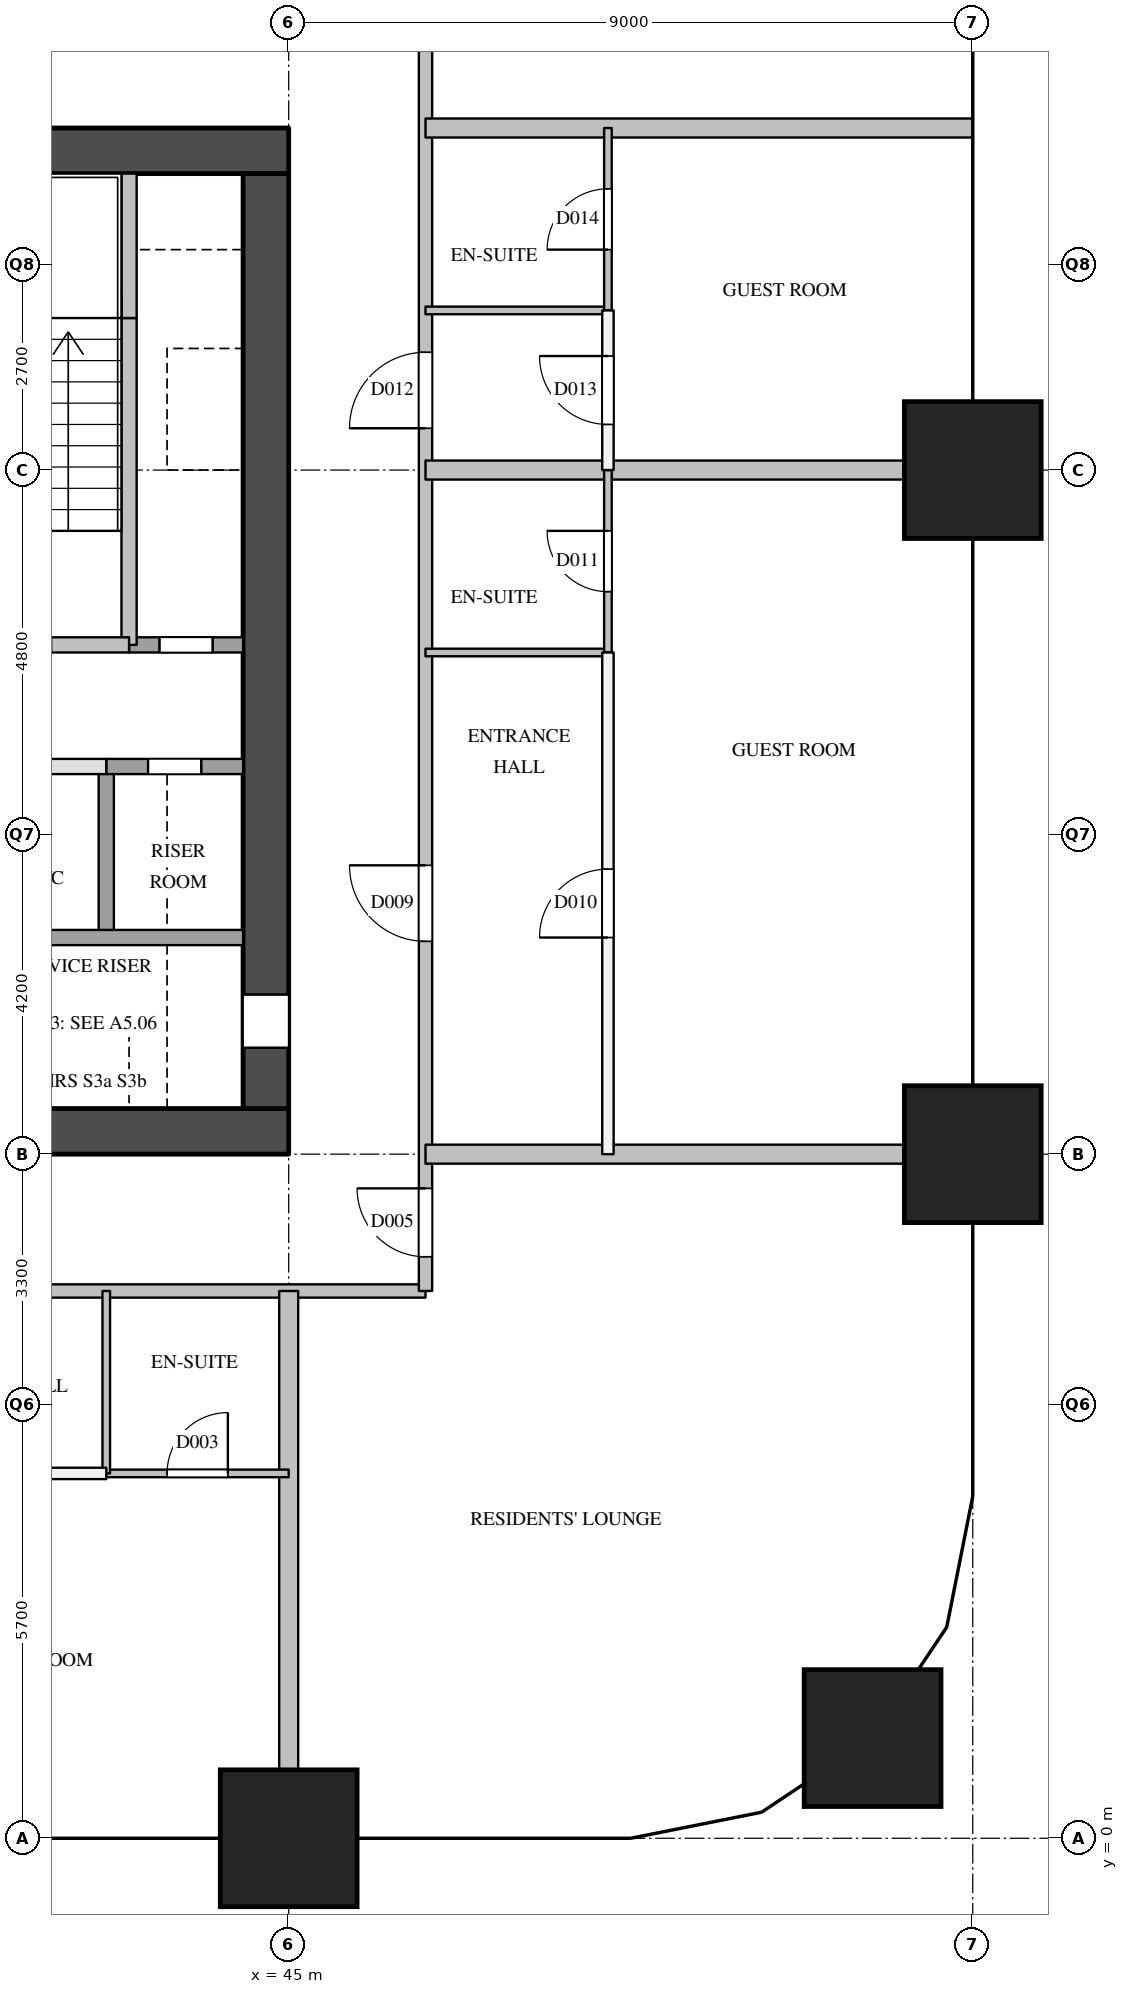
"""IFC4 building model, lengths in metres.
Left out: names, types, materials, properties, quantities, classifications, styles, units other than length and angle.
Written with IfcOpenShell. Run it as: python <this file> out.ifc"""

import sys

from ifc_helpers import new_model, si_unit, direction, frame, frame_2d, origin, origin_2d, place, context, subcontext, project, spatial, rectangle, extrude, element, fill, save


model = new_model("IFC4")
c1 = context("Model", 3, precision=1e-05, world=origin(), true_north=direction((0.0, 1.0)))
c2 = subcontext(c1, "Body", "Model", "MODEL_VIEW")
j1 = project(units=[si_unit("LENGTHUNIT", "METRE"), si_unit("PLANEANGLEUNIT", "RADIAN")], contexts=[c1])
p1 = place(None, origin())
s1 = spatial("IfcSite", under=j1, at=p1, CompositionType="ELEMENT")
p2 = place(p1, origin())
s2 = spatial("IfcBuilding", under=s1, at=p2, CompositionType="ELEMENT")
p3 = place(p2, frame((0.0, 0.0, 100.6)))
s3 = spatial("IfcBuildingStorey", under=s2, at=p3, CompositionType="ELEMENT", Elevation=100.6)
for number, where, z_axis, x_axis in (
    (1, (45.0, 0.0, 0.0), (0.0, 0.0, 1.0), (1.0, 0.0, 0.0)),
    (2, (52.682, 1.318, 0.0), (0.0, 0.0, 1.0), (1.0, 0.0, 0.0)),
    (3, (54.0, 9.0, 0.0), (0.0, 0.0, 1.0), (1.0, 0.0, 0.0)),
    (4, (54.0, 18.0, 0.0), (0.0, 0.0, 1.0), (1.0, 0.0, 0.0)),
):
    element("IfcColumn", number, at=place(p3, frame(where, z_axis=z_axis, x_axis=x_axis)), inside=s3, PredefinedType="COLUMN", context=c2, shape_type="SweptSolid", body=[
        extrude(rectangle(XDim=1.8, YDim=1.8, at=origin_2d()), origin(), (0.0, 0.0, 1.0), 3.8),
    ])
for number, where, z_axis, x_axis in (
    (5, (36.0, 9.3, 0.0), (0.0, 0.0, 1.0), (1.0, 0.0, 0.0)),
    (6, (36.0, 22.2, 0.0), (0.0, 0.0, 1.0), (1.0, 0.0, 0.0)),
):
    element("IfcWall", number, at=place(p3, frame(where, z_axis=z_axis, x_axis=x_axis)), inside=s3, PredefinedType="SHEAR", context=c2, shape_type="SweptSolid", body=[
        extrude(rectangle(XDim=9.0, YDim=0.6, at=frame_2d((4.5, 0.0))), origin(), (0.0, 0.0, 1.0), 3.5),
    ])
p4 = place(p3, frame((44.7, 9.6, 0.0), z_axis=(0.0, 0.0, 1.0), x_axis=(0.0, 1.0, 0.0)))
e7 = element("IfcWall", 7, at=p4, inside=s3, PredefinedType="SHEAR", context=c2, shape_type="SweptSolid", body=[
    extrude(rectangle(XDim=12.3, YDim=0.6, at=frame_2d((6.15, 0.0))), origin(), (0.0, 0.0, 1.0), 3.5),
])
p5 = place(p4, frame((0.8, 0.0, 0.0)))
e8 = element("IfcOpeningElement", 8, at=p5, cuts=e7, PredefinedType="OPENING", context=c2, shape_type="SweptSolid", body=[
    extrude(rectangle(XDim=0.7, YDim=2.1, at=frame_2d((0.35, 1.05))), frame((0.0, 0.31, 0.0), z_axis=(0.0, -1.0, 0.0), x_axis=(1.0, 0.0, 0.0)), (0.0, 0.0, 1.0), 0.62),
])
p6 = place(p3, frame((42.6, 11.9, 0.0), z_axis=(0.0, 0.0, 1.0), x_axis=(0.0, 1.0, 0.0)))
e9 = element("IfcWall", 9, at=p6, inside=s3, PredefinedType="SOLIDWALL", context=c2, shape_type="SweptSolid", body=[
    extrude(rectangle(XDim=2.2, YDim=0.2, at=frame_2d((1.1, 0.0))), origin(), (0.0, 0.0, 1.0), 3.5),
])
p7 = place(p3, frame((42.9, 15.7, 0.0), z_axis=(0.0, 0.0, 1.0), x_axis=(0.0, 1.0, 0.0)))
e10 = element("IfcWall", 10, at=p7, inside=s3, PredefinedType="SOLIDWALL", context=c2, shape_type="SweptSolid", body=[
    extrude(rectangle(XDim=4.3, YDim=0.2, at=frame_2d((2.15, 0.0))), origin(), (0.0, 0.0, 1.0), 3.5),
])
p8 = place(p3, frame((42.9, 20.0, 0.0), z_axis=(0.0, 0.0, 1.0), x_axis=(0.0, 1.0, 0.0)))
e11 = element("IfcWall", 11, at=p8, inside=s3, PredefinedType="SOLIDWALL", context=c2, shape_type="SweptSolid", body=[
    extrude(rectangle(XDim=1.9, YDim=0.2, at=frame_2d((0.95, 0.0))), origin(), (0.0, 0.0, 1.0), 3.5),
])
p9 = place(p3, frame((36.6, 11.85, 0.0), z_axis=(0.0, 0.0, 1.0), x_axis=(1.0, 0.0, 0.0)))
e12 = element("IfcWall", 12, at=p9, inside=s3, PredefinedType="SOLIDWALL", context=c2, shape_type="SweptSolid", body=[
    extrude(rectangle(XDim=7.8, YDim=0.2, at=frame_2d((3.9, 0.0))), origin(), (0.0, 0.0, 1.0), 3.5),
])
p10 = place(p3, frame((36.6, 14.1, 0.0), z_axis=(0.0, 0.0, 1.0), x_axis=(1.0, 0.0, 0.0)))
e13 = element("IfcWall", 13, at=p10, inside=s3, PredefinedType="PARTITIONING", context=c2, shape_type="SweptSolid", body=[
    extrude(rectangle(XDim=6.0, YDim=0.2, at=frame_2d((3.0, 0.0))), origin(), (0.0, 0.0, 1.0), 3.5),
])
p11 = place(p10, frame((0.9, 0.0, 0.0)))
e14 = element("IfcOpeningElement", 14, at=p11, cuts=e13, PredefinedType="OPENING", context=c2, shape_type="SweptSolid", body=[
    extrude(rectangle(XDim=0.9, YDim=2.1, at=frame_2d((0.45, 1.05))), frame((0.0, 0.11, 0.0), z_axis=(0.0, -1.0, 0.0), x_axis=(1.0, 0.0, 0.0)), (0.0, 0.0, 1.0), 0.22),
])
p12 = place(p10, frame((3.9, 0.0, 0.0)))
e15 = element("IfcOpeningElement", 15, at=p12, cuts=e13, PredefinedType="OPENING", context=c2, shape_type="SweptSolid", body=[
    extrude(rectangle(XDim=0.9, YDim=2.1, at=frame_2d((0.45, 1.05))), frame((0.0, 0.11, 0.0), z_axis=(0.0, -1.0, 0.0), x_axis=(1.0, 0.0, 0.0)), (0.0, 0.0, 1.0), 0.22),
])
p13 = place(p3, frame((42.6, 14.1, 0.0), z_axis=(0.0, 0.0, 1.0), x_axis=(1.0, 0.0, 0.0)))
e16 = element("IfcWall", 16, at=p13, inside=s3, PredefinedType="SOLIDWALL", context=c2, shape_type="SweptSolid", body=[
    extrude(rectangle(XDim=1.8, YDim=0.2, at=frame_2d((0.9, 0.0))), origin(), (0.0, 0.0, 1.0), 3.5),
])
p14 = place(p13, frame((0.55, 0.0, 0.0)))
e17 = element("IfcOpeningElement", 17, at=p14, cuts=e16, PredefinedType="OPENING", context=c2, shape_type="SweptSolid", body=[
    extrude(rectangle(XDim=0.7, YDim=2.1, at=frame_2d((0.35, 1.05))), frame((0.0, 0.11, 0.0), z_axis=(0.0, -1.0, 0.0), x_axis=(1.0, 0.0, 0.0)), (0.0, 0.0, 1.0), 0.22),
])
p15 = place(p3, frame((42.9, 15.7, 0.0), z_axis=(0.0, 0.0, 1.0), x_axis=(1.0, 0.0, 0.0)))
e18 = element("IfcWall", 18, at=p15, inside=s3, PredefinedType="SOLIDWALL", context=c2, shape_type="SweptSolid", body=[
    extrude(rectangle(XDim=1.5, YDim=0.2, at=frame_2d((0.75, 0.0))), origin(), (0.0, 0.0, 1.0), 3.5),
])
p16 = place(p15, frame((0.4, 0.0, 0.0)))
e19 = element("IfcOpeningElement", 19, at=p16, cuts=e18, PredefinedType="OPENING", context=c2, shape_type="SweptSolid", body=[
    extrude(rectangle(XDim=0.7, YDim=2.1, at=frame_2d((0.35, 1.05))), frame((0.0, 0.11, 0.0), z_axis=(0.0, -1.0, 0.0), x_axis=(1.0, 0.0, 0.0)), (0.0, 0.0, 1.0), 0.22),
])
p17 = place(p3, frame((36.6, 15.7, 0.0), z_axis=(0.0, 0.0, 1.0), x_axis=(1.0, 0.0, 0.0)))
e20 = element("IfcWall", 20, at=p17, inside=s3, PredefinedType="SOLIDWALL", context=c2, shape_type="SweptSolid", body=[
    extrude(rectangle(XDim=6.3, YDim=0.2, at=frame_2d((3.15, 0.0))), origin(), (0.0, 0.0, 1.0), 3.5),
])
p18 = place(p17, frame((1.025, 0.0, 0.0)))
e21 = element("IfcOpeningElement", 21, at=p18, cuts=e20, PredefinedType="OPENING", context=c2, shape_type="SweptSolid", body=[
    extrude(rectangle(XDim=1.1, YDim=2.1, at=frame_2d((0.55, 1.05))), frame((0.0, 0.11, 0.0), z_axis=(0.0, -1.0, 0.0), x_axis=(1.0, 0.0, 0.0)), (0.0, 0.0, 1.0), 0.22),
])
p19 = place(p17, frame((4.175, 0.0, 0.0)))
e22 = element("IfcOpeningElement", 22, at=p19, cuts=e20, PredefinedType="OPENING", context=c2, shape_type="SweptSolid", body=[
    extrude(rectangle(XDim=1.1, YDim=2.1, at=frame_2d((0.55, 1.05))), frame((0.0, 0.11, 0.0), z_axis=(0.0, -1.0, 0.0), x_axis=(1.0, 0.0, 0.0)), (0.0, 0.0, 1.0), 0.22),
])
p20 = place(p3, frame((34.2, 7.2, 0.0), z_axis=(0.0, 0.0, 1.0), x_axis=(1.0, 0.0, 0.0)))
e23 = element("IfcWall", 23, at=p20, inside=s3, PredefinedType="PARTITIONING", context=c2, shape_type="SweptSolid", body=[
    extrude(rectangle(XDim=12.6, YDim=0.175, at=frame_2d((6.3, 0.0))), origin(), (0.0, 0.0, 1.0), 3.5),
])
p21 = place(p20, frame((4.6, 0.0, 0.0)))
e24 = element("IfcOpeningElement", 24, at=p21, cuts=e23, PredefinedType="OPENING", context=c2, shape_type="SweptSolid", body=[
    extrude(rectangle(XDim=1.0, YDim=2.1, at=frame_2d((0.5, 1.05))), frame((0.0, 0.097, 0.0), z_axis=(0.0, -1.0, 0.0), x_axis=(1.0, 0.0, 0.0)), (0.0, 0.0, 1.0), 0.195),
])
p22 = place(p3, frame((46.8, 7.2, 0.0), z_axis=(0.0, 0.0, 1.0), x_axis=(0.0, 1.0, 0.0)))
e25 = element("IfcWall", 25, at=p22, inside=s3, PredefinedType="PARTITIONING", context=c2, shape_type="SweptSolid", body=[
    extrude(rectangle(XDim=16.49, YDim=0.175, at=frame_2d((8.245, 0.0))), origin(), (0.0, 0.0, 1.0), 3.5),
])
p23 = place(p22, frame((0.45, 0.0, 0.0)))
e26 = element("IfcOpeningElement", 26, at=p23, cuts=e25, PredefinedType="OPENING", context=c2, shape_type="SweptSolid", body=[
    extrude(rectangle(XDim=0.9, YDim=2.1, at=frame_2d((0.45, 1.05))), frame((0.0, 0.097, 0.0), z_axis=(0.0, -1.0, 0.0), x_axis=(1.0, 0.0, 0.0)), (0.0, 0.0, 1.0), 0.195),
])
p24 = place(p22, frame((4.6, 0.0, 0.0)))
e27 = element("IfcOpeningElement", 27, at=p24, cuts=e25, PredefinedType="OPENING", context=c2, shape_type="SweptSolid", body=[
    extrude(rectangle(XDim=1.0, YDim=2.1, at=frame_2d((0.5, 1.05))), frame((0.0, 0.097, 0.0), z_axis=(0.0, -1.0, 0.0), x_axis=(1.0, 0.0, 0.0)), (0.0, 0.0, 1.0), 0.195),
])
p25 = place(p22, frame((11.35, 0.0, 0.0)))
e28 = element("IfcOpeningElement", 28, at=p25, cuts=e25, PredefinedType="OPENING", context=c2, shape_type="SweptSolid", body=[
    extrude(rectangle(XDim=1.0, YDim=2.1, at=frame_2d((0.5, 1.05))), frame((0.0, 0.097, 0.0), z_axis=(0.0, -1.0, 0.0), x_axis=(1.0, 0.0, 0.0)), (0.0, 0.0, 1.0), 0.195),
])
p26 = place(p3, frame((36.0, 4.8, 0.0), z_axis=(0.0, 0.0, 1.0), x_axis=(1.0, 0.0, 0.0)))
e29 = element("IfcWall", 29, at=p26, inside=s3, PredefinedType="PARTITIONING", context=c2, shape_type="SweptSolid", body=[
    extrude(rectangle(XDim=6.6, YDim=0.15, at=frame_2d((3.3, 0.0))), origin(), (0.0, 0.0, 1.0), 3.5),
])
p27 = place(p26, frame((2.85, 0.0, 0.0)))
e30 = element("IfcOpeningElement", 30, at=p27, cuts=e29, PredefinedType="OPENING", context=c2, shape_type="SweptSolid", body=[
    extrude(rectangle(XDim=0.9, YDim=2.1, at=frame_2d((0.45, 1.05))), frame((0.0, 0.085, 0.0), z_axis=(0.0, -1.0, 0.0), x_axis=(1.0, 0.0, 0.0)), (0.0, 0.0, 1.0), 0.17),
])
p28 = place(p3, frame((49.2, 9.0, 0.0), z_axis=(0.0, 0.0, 1.0), x_axis=(0.0, 1.0, 0.0)))
e31 = element("IfcWall", 31, at=p28, inside=s3, PredefinedType="PARTITIONING", context=c2, shape_type="SweptSolid", body=[
    extrude(rectangle(XDim=6.6, YDim=0.15, at=frame_2d((3.3, 0.0))), origin(), (0.0, 0.0, 1.0), 3.5),
])
p29 = place(p28, frame((2.85, 0.0, 0.0)))
e32 = element("IfcOpeningElement", 32, at=p29, cuts=e31, PredefinedType="OPENING", context=c2, shape_type="SweptSolid", body=[
    extrude(rectangle(XDim=0.9, YDim=2.1, at=frame_2d((0.45, 1.05))), frame((0.0, 0.085, 0.0), z_axis=(0.0, -1.0, 0.0), x_axis=(1.0, 0.0, 0.0)), (0.0, 0.0, 1.0), 0.17),
])
p30 = place(p3, frame((49.2, 18.0, 0.0), z_axis=(0.0, 0.0, 1.0), x_axis=(0.0, 1.0, 0.0)))
e33 = element("IfcWall", 33, at=p30, inside=s3, PredefinedType="PARTITIONING", context=c2, shape_type="SweptSolid", body=[
    extrude(rectangle(XDim=2.1, YDim=0.15, at=frame_2d((1.05, 0.0))), origin(), (0.0, 0.0, 1.0), 3.5),
])
p31 = place(p30, frame((0.6, 0.0, 0.0)))
e34 = element("IfcOpeningElement", 34, at=p31, cuts=e33, PredefinedType="OPENING", context=c2, shape_type="SweptSolid", body=[
    extrude(rectangle(XDim=0.9, YDim=2.1, at=frame_2d((0.45, 1.05))), frame((0.0, 0.085, 0.0), z_axis=(0.0, -1.0, 0.0), x_axis=(1.0, 0.0, 0.0)), (0.0, 0.0, 1.0), 0.17),
])
for number, where, z_axis, x_axis in (
    (35, (46.8, 9.0, 0.0), (0.0, 0.0, 1.0), (1.0, 0.0, 0.0)),
    (36, (46.8, 18.0, 0.0), (0.0, 0.0, 1.0), (1.0, 0.0, 0.0)),
):
    element("IfcWall", number, at=place(p3, frame(where, z_axis=z_axis, x_axis=x_axis)), inside=s3, PredefinedType="PARTITIONING", context=c2, shape_type="SweptSolid", body=[
        extrude(rectangle(XDim=7.2, YDim=0.25, at=frame_2d((3.6, 0.0))), origin(), (0.0, 0.0, 1.0), 3.5),
    ])
p32 = place(p3, frame((46.8, 22.5, 0.0), z_axis=(0.0, 0.0, 1.0), x_axis=(1.0, 0.0, 0.0)))
e37 = element("IfcWall", 37, at=p32, inside=s3, PredefinedType="PARTITIONING", context=c2, shape_type="SweptSolid", body=[
    extrude(rectangle(XDim=7.2, YDim=0.25, at=frame_2d((3.6, 0.0))), origin(), (0.0, 0.0, 1.0), 2.5),
])
p33 = place(p3, frame((45.0, 0.0, 0.0), z_axis=(0.0, 0.0, 1.0), x_axis=(0.0, 1.0, 0.0)))
e38 = element("IfcWall", 38, at=p33, inside=s3, PredefinedType="PARTITIONING", context=c2, shape_type="SweptSolid", body=[
    extrude(rectangle(XDim=7.2, YDim=0.25, at=frame_2d((3.6, 0.0))), origin(), (0.0, 0.0, 1.0), 3.5),
])
p34 = place(p3, frame((42.6, 4.8, 0.0), z_axis=(0.0, 0.0, 1.0), x_axis=(1.0, 0.0, 0.0)))
e39 = element("IfcWall", 39, at=p34, inside=s3, PredefinedType="PARTITIONING", context=c2, shape_type="SweptSolid", body=[
    extrude(rectangle(XDim=2.4, YDim=0.1, at=frame_2d((1.2, 0.0))), origin(), (0.0, 0.0, 1.0), 3.5),
])
p35 = place(p34, frame((0.8, 0.0, 0.0)))
e40 = element("IfcOpeningElement", 40, at=p35, cuts=e39, PredefinedType="OPENING", context=c2, shape_type="SweptSolid", body=[
    extrude(rectangle(XDim=0.8, YDim=2.1, at=frame_2d((0.4, 1.05))), frame((0.0, 0.06, 0.0), z_axis=(0.0, -1.0, 0.0), x_axis=(1.0, 0.0, 0.0)), (0.0, 0.0, 1.0), 0.12),
])
for number, where, z_axis, x_axis in (
    (41, (46.8, 15.6, 0.0), (0.0, 0.0, 1.0), (1.0, 0.0, 0.0)),
    (42, (46.8, 20.1, 0.0), (0.0, 0.0, 1.0), (1.0, 0.0, 0.0)),
    (43, (42.6, 4.8, 0.0), (0.0, 0.0, 1.0), (0.0, 1.0, 0.0)),
):
    element("IfcWall", number, at=place(p3, frame(where, z_axis=z_axis, x_axis=x_axis)), inside=s3, PredefinedType="PARTITIONING", context=c2, shape_type="SweptSolid", body=[
        extrude(rectangle(XDim=2.4, YDim=0.1, at=frame_2d((1.2, 0.0))), origin(), (0.0, 0.0, 1.0), 3.5),
    ])
p36 = place(p3, frame((49.2, 15.6, 0.0), z_axis=(0.0, 0.0, 1.0), x_axis=(0.0, 1.0, 0.0)))
e44 = element("IfcWall", 44, at=p36, inside=s3, PredefinedType="PARTITIONING", context=c2, shape_type="SweptSolid", body=[
    extrude(rectangle(XDim=2.4, YDim=0.1, at=frame_2d((1.2, 0.0))), origin(), (0.0, 0.0, 1.0), 3.5),
])
p37 = place(p36, frame((0.8, 0.0, 0.0)))
e45 = element("IfcOpeningElement", 45, at=p37, cuts=e44, PredefinedType="OPENING", context=c2, shape_type="SweptSolid", body=[
    extrude(rectangle(XDim=0.8, YDim=2.1, at=frame_2d((0.4, 1.05))), frame((0.0, 0.06, 0.0), z_axis=(0.0, -1.0, 0.0), x_axis=(1.0, 0.0, 0.0)), (0.0, 0.0, 1.0), 0.12),
])
p38 = place(p3, frame((49.2, 20.1, 0.0), z_axis=(0.0, 0.0, 1.0), x_axis=(0.0, 1.0, 0.0)))
e46 = element("IfcWall", 46, at=p38, inside=s3, PredefinedType="PARTITIONING", context=c2, shape_type="SweptSolid", body=[
    extrude(rectangle(XDim=2.4, YDim=0.1, at=frame_2d((1.2, 0.0))), origin(), (0.0, 0.0, 1.0), 3.5),
])
p39 = place(p38, frame((0.8, 0.0, 0.0)))
e47 = element("IfcOpeningElement", 47, at=p39, cuts=e46, PredefinedType="OPENING", context=c2, shape_type="SweptSolid", body=[
    extrude(rectangle(XDim=0.8, YDim=2.1, at=frame_2d((0.4, 1.05))), frame((0.0, 0.06, 0.0), z_axis=(0.0, -1.0, 0.0), x_axis=(1.0, 0.0, 0.0)), (0.0, 0.0, 1.0), 0.12),
])
p40 = place(p16, origin())
e48 = element("IfcDoor", 48, at=p40, inside=s3, OperationType="SINGLE_SWING_LEFT", PredefinedType="DOOR", context=c2, shape_type="SweptSolid", body=[
    extrude(rectangle(XDim=0.7, YDim=2.1, at=frame_2d((0.35, 1.05))), frame((0.0, 0.025, 0.0), z_axis=(0.0, -1.0, 0.0), x_axis=(1.0, 0.0, 0.0)), (0.0, 0.0, 1.0), 0.05),
])
fill(e19, e48)
p41 = place(p14, origin())
e49 = element("IfcDoor", 49, at=p41, inside=s3, OperationType="SINGLE_SWING_RIGHT", PredefinedType="DOOR", context=c2, shape_type="SweptSolid", body=[
    extrude(rectangle(XDim=0.7, YDim=2.1, at=frame_2d((0.35, 1.05))), frame((0.0, 0.025, 0.0), z_axis=(0.0, -1.0, 0.0), x_axis=(1.0, 0.0, 0.0)), (0.0, 0.0, 1.0), 0.05),
])
fill(e17, e49)
p42 = place(p5, origin())
e50 = element("IfcDoor", 50, at=p42, inside=s3, OperationType="SINGLE_SWING_LEFT", PredefinedType="DOOR", context=c2, shape_type="SweptSolid", body=[
    extrude(rectangle(XDim=0.7, YDim=2.1, at=frame_2d((0.35, 1.05))), frame((0.0, 0.025, 0.0), z_axis=(0.0, -1.0, 0.0), x_axis=(1.0, 0.0, 0.0)), (0.0, 0.0, 1.0), 0.05),
])
fill(e8, e50)
p43 = place(p35, origin())
e51 = element("IfcDoor", 51, at=p43, inside=s3, OperationType="SINGLE_SWING_RIGHT", PredefinedType="DOOR", context=c2, shape_type="SweptSolid", body=[
    extrude(rectangle(XDim=0.8, YDim=2.1, at=frame_2d((0.4, 1.05))), frame((0.0, 0.025, 0.0), z_axis=(0.0, -1.0, 0.0), x_axis=(1.0, 0.0, 0.0)), (0.0, 0.0, 1.0), 0.05),
])
fill(e40, e51)
p44 = place(p23, origin())
e52 = element("IfcDoor", 52, at=p44, inside=s3, OperationType="SINGLE_SWING_RIGHT", PredefinedType="DOOR", context=c2, shape_type="SweptSolid", body=[
    extrude(rectangle(XDim=0.9, YDim=2.1, at=frame_2d((0.45, 1.05))), frame((0.0, 0.025, 0.0), z_axis=(0.0, -1.0, 0.0), x_axis=(1.0, 0.0, 0.0)), (0.0, 0.0, 1.0), 0.05),
])
fill(e26, e52)
p45 = place(p24, origin())
e53 = element("IfcDoor", 53, at=p45, inside=s3, OperationType="SINGLE_SWING_RIGHT", PredefinedType="DOOR", context=c2, shape_type="SweptSolid", body=[
    extrude(rectangle(XDim=1.0, YDim=2.1, at=frame_2d((0.5, 1.05))), frame((0.0, 0.025, 0.0), z_axis=(0.0, -1.0, 0.0), x_axis=(1.0, 0.0, 0.0)), (0.0, 0.0, 1.0), 0.05),
])
fill(e27, e53)
p46 = place(p29, origin())
e54 = element("IfcDoor", 54, at=p46, inside=s3, OperationType="SINGLE_SWING_LEFT", PredefinedType="DOOR", context=c2, shape_type="SweptSolid", body=[
    extrude(rectangle(XDim=0.9, YDim=2.1, at=frame_2d((0.45, 1.05))), frame((0.0, 0.025, 0.0), z_axis=(0.0, -1.0, 0.0), x_axis=(1.0, 0.0, 0.0)), (0.0, 0.0, 1.0), 0.05),
])
fill(e32, e54)
p47 = place(p37, origin())
e55 = element("IfcDoor", 55, at=p47, inside=s3, OperationType="SINGLE_SWING_RIGHT", PredefinedType="DOOR", context=c2, shape_type="SweptSolid", body=[
    extrude(rectangle(XDim=0.8, YDim=2.1, at=frame_2d((0.4, 1.05))), frame((0.0, 0.025, 0.0), z_axis=(0.0, -1.0, 0.0), x_axis=(1.0, 0.0, 0.0)), (0.0, 0.0, 1.0), 0.05),
])
fill(e45, e55)
p48 = place(p25, origin())
e56 = element("IfcDoor", 56, at=p48, inside=s3, OperationType="SINGLE_SWING_LEFT", PredefinedType="DOOR", context=c2, shape_type="SweptSolid", body=[
    extrude(rectangle(XDim=1.0, YDim=2.1, at=frame_2d((0.5, 1.05))), frame((0.0, 0.025, 0.0), z_axis=(0.0, -1.0, 0.0), x_axis=(1.0, 0.0, 0.0)), (0.0, 0.0, 1.0), 0.05),
])
fill(e28, e56)
p49 = place(p31, origin())
e57 = element("IfcDoor", 57, at=p49, inside=s3, OperationType="SINGLE_SWING_RIGHT", PredefinedType="DOOR", context=c2, shape_type="SweptSolid", body=[
    extrude(rectangle(XDim=0.9, YDim=2.1, at=frame_2d((0.45, 1.05))), frame((0.0, 0.025, 0.0), z_axis=(0.0, -1.0, 0.0), x_axis=(1.0, 0.0, 0.0)), (0.0, 0.0, 1.0), 0.05),
])
fill(e34, e57)
p50 = place(p39, origin())
e58 = element("IfcDoor", 58, at=p50, inside=s3, OperationType="SINGLE_SWING_LEFT", PredefinedType="DOOR", context=c2, shape_type="SweptSolid", body=[
    extrude(rectangle(XDim=0.8, YDim=2.1, at=frame_2d((0.4, 1.05))), frame((0.0, 0.025, 0.0), z_axis=(0.0, -1.0, 0.0), x_axis=(1.0, 0.0, 0.0)), (0.0, 0.0, 1.0), 0.05),
])
fill(e47, e58)
save(model, sys.argv[1])
